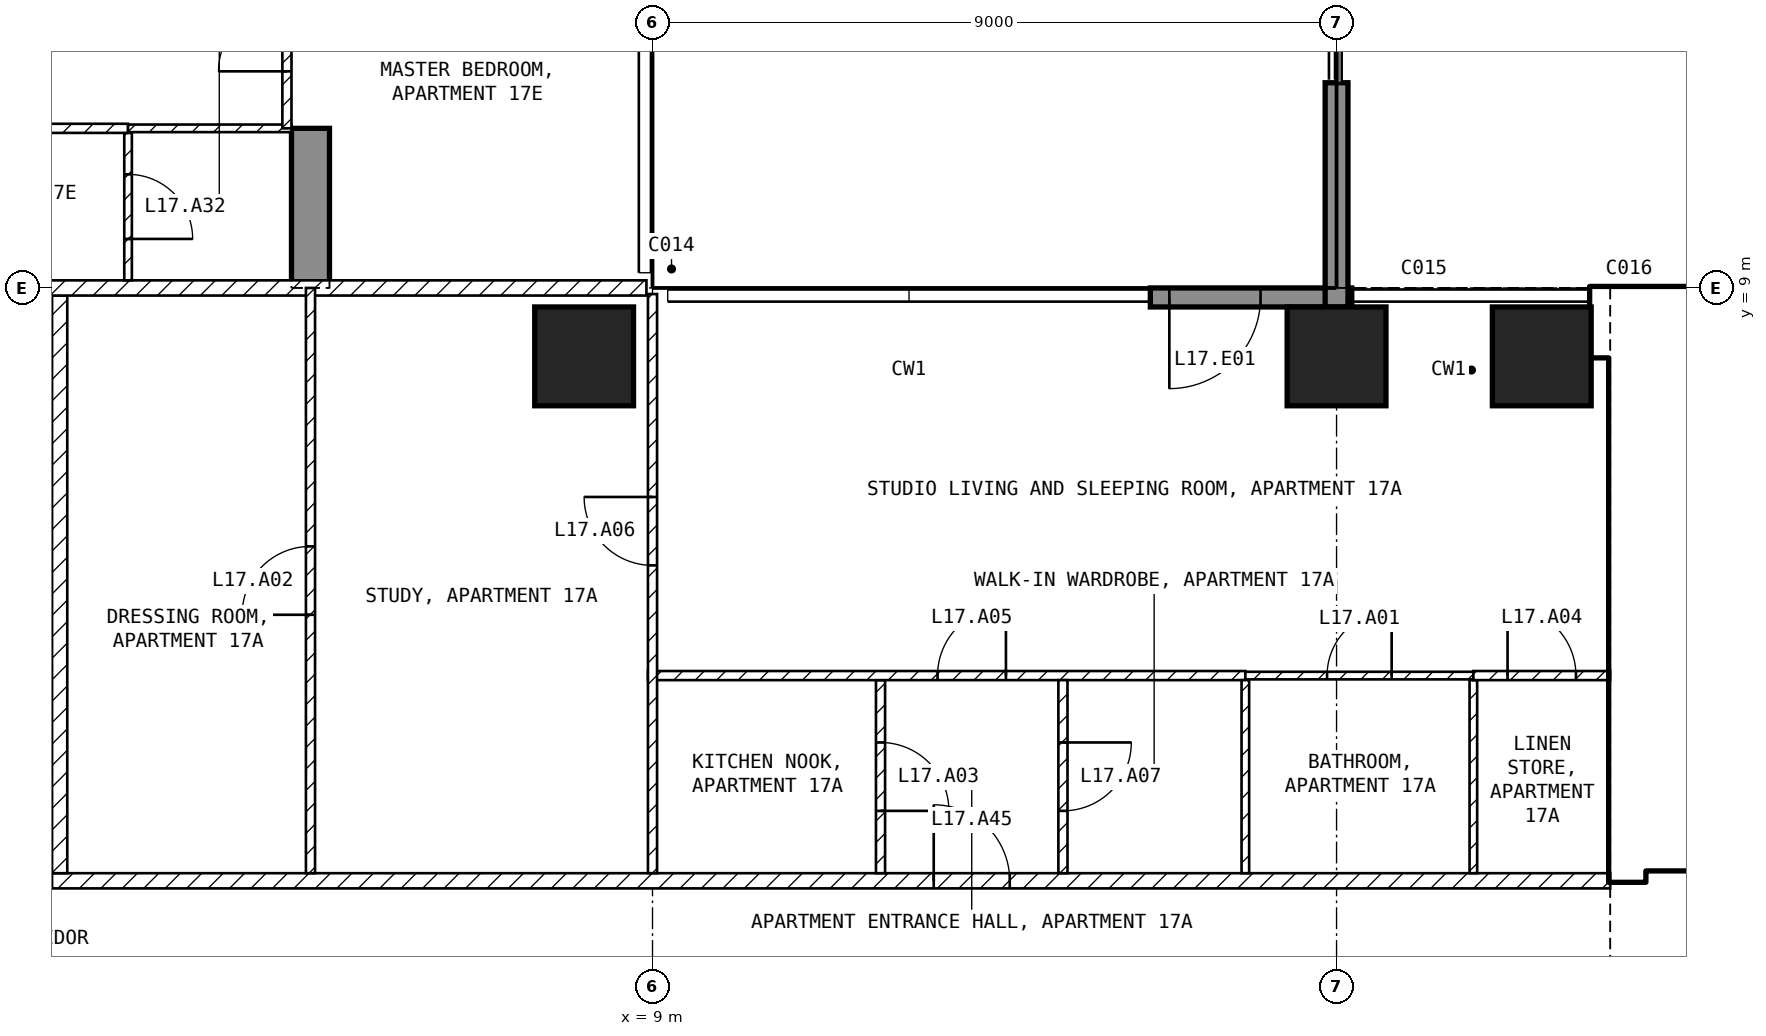
"""IFC4 building model, lengths in metres.
Left out: names, types, materials, properties, quantities, classifications, styles, units other than length and angle.
Written with IfcOpenShell. Run it as: python <this file> out.ifc"""

import sys

from ifc_helpers import new_model, si_unit, direction, frame, frame_2d, origin, origin_2d, place, context, subcontext, project, spatial, polyline, rectangle, outline, extrude, element, fill, save


model = new_model("IFC4")
c1 = context("Model", 3, precision=1e-05, world=origin(), true_north=direction((0.0, 1.0)))
c2 = subcontext(c1, "Body", "Model", "MODEL_VIEW")
j1 = project(units=[si_unit("LENGTHUNIT", "METRE"), si_unit("PLANEANGLEUNIT", "RADIAN")], contexts=[c1])
p1 = place(None, origin())
s1 = spatial("IfcSite", under=j1, at=p1, CompositionType="ELEMENT")
p2 = place(p1, origin())
s2 = spatial("IfcBuilding", under=s1, at=p2, CompositionType="ELEMENT")
p3 = place(p2, frame((0.0, 0.0, 78.5)))
s3 = spatial("IfcBuildingStorey", under=s2, at=p3, CompositionType="ELEMENT", Elevation=78.5)
for number, where, z_axis, x_axis in (
    (1, (8.1, 8.1, -0.25), (0.0, 0.0, 1.0), (1.0, 0.0, 0.0)),
    (2, (18.0, 8.1, -0.25), (0.0, 0.0, 1.0), (1.0, 0.0, 0.0)),
    (3, (20.7, 8.1, -0.25), (0.0, 0.0, 1.0), (1.0, 0.0, 0.0)),
):
    element("IfcColumn", number, at=place(p3, frame(where, z_axis=z_axis, x_axis=x_axis)), inside=s3, PredefinedType="COLUMN", context=c2, shape_type="SweptSolid", body=[
        extrude(rectangle(XDim=1.3, YDim=1.3, at=origin_2d()), origin(), (0.0, 0.0, 1.0), 3.5),
    ])
p4 = place(p3, frame((4.25, 9.0, -0.25), z_axis=(1.0, 0.0, 0.0), x_axis=(0.0, 1.0, 0.0)))
e4 = element("IfcWall", 4, at=p4, inside=s3, PredefinedType="SHEAR", context=c2, shape_type="SweptSolid", body=[
    extrude(outline(polyline([(0.0, 0.0), (2.1, 0.0), (2.1, 2.65), (4.5, 2.65), (4.5, 0.0), (9.9, 0.0), (9.9, 2.65), (12.3, 2.65), (12.3, 0.0), (16.45, 0.0), (16.45, 3.5), (0.0, 3.5), (0.0, 0.0)])), origin(), (0.0, 0.0, 1.0), 0.5),
])
p5 = place(p3, frame((18.2, 8.875, 0.0), z_axis=(0.0, 0.0, 1.0), x_axis=(-1.0, 0.0, 0.0)))
e5 = element("IfcWall", 5, at=p5, inside=s3, PredefinedType="SOLIDWALL", context=c2, shape_type="SweptSolid", body=[
    extrude(rectangle(XDim=2.65, YDim=0.25, at=frame_2d((1.325, 0.0))), origin(), (0.0, 0.0, 1.0), 3.25),
])
p6 = place(p5, frame((1.2, 0.0, 0.0)))
e6 = element("IfcOpeningElement", 6, at=p6, cuts=e5, PredefinedType="OPENING", context=c2, shape_type="SweptSolid", body=[
    extrude(rectangle(XDim=1.2, YDim=2.4, at=frame_2d((0.6, 1.2))), frame((0.0, 0.135, 0.0), z_axis=(0.0, -1.0, 0.0), x_axis=(1.0, 0.0, 0.0)), (0.0, 0.0, 1.0), 0.27),
])
p7 = place(p3, frame((18.0, 8.75, 0.0), z_axis=(0.0, 0.0, 1.0), x_axis=(0.0, 1.0, 0.0)))
e7 = element("IfcWall", 7, at=p7, inside=s3, PredefinedType="SOLIDWALL", context=c2, shape_type="SweptSolid", body=[
    extrude(rectangle(XDim=2.95, YDim=0.3, at=frame_2d((1.475, 0.0))), origin(), (0.0, 0.0, 1.0), 3.25),
])
p8 = place(p3, frame((21.35, 8.55, 0.0), z_axis=(0.0, 0.0, 1.0), x_axis=(1.0, 0.0, 0.0)))
e8 = element("IfcWall", 8, at=p8, inside=s3, PredefinedType="SHEAR", context=c2, shape_type="SweptSolid", body=[
    extrude(rectangle(XDim=10.15, YDim=0.9, at=frame_2d((5.075, 0.0))), origin(), (0.0, 0.0, 1.0), 3.25),
])
p9 = place(p3, frame((21.825, 1.2, 0.0), z_axis=(0.0, 0.0, 1.0), x_axis=(0.0, 1.0, 0.0)))
e9 = element("IfcWall", 9, at=p9, inside=s3, PredefinedType="SHEAR", context=c2, shape_type="SweptSolid", body=[
    extrude(rectangle(XDim=6.9, YDim=0.45, at=frame_2d((3.45, 0.0))), origin(), (0.0, 0.0, 1.0), 3.25),
])
p10 = place(p3, frame((22.05, 1.45, 0.0), z_axis=(0.0, 0.0, 1.0), x_axis=(1.0, 0.0, 0.0)))
e10 = element("IfcWall", 10, at=p10, inside=s3, PredefinedType="SOLIDWALL", context=c2, shape_type="SweptSolid", body=[
    extrude(rectangle(XDim=13.05, YDim=0.2, at=frame_2d((6.525, 0.0))), origin(), (0.0, 0.0, 1.0), 3.25),
])
p11 = place(p10, frame((0.75, 0.0, 0.0)))
e11 = element("IfcOpeningElement", 11, at=p11, cuts=e10, PredefinedType="OPENING", context=c2, shape_type="SweptSolid", body=[
    extrude(rectangle(XDim=1.0, YDim=2.1, at=frame_2d((0.5, 1.05))), frame((0.0, 0.11, 0.0), z_axis=(0.0, -1.0, 0.0), x_axis=(1.0, 0.0, 0.0)), (0.0, 0.0, 1.0), 0.22),
])
p12 = place(p10, frame((3.25, 0.0, 0.0)))
e12 = element("IfcOpeningElement", 12, at=p12, cuts=e10, PredefinedType="OPENING", context=c2, shape_type="SweptSolid", body=[
    extrude(rectangle(XDim=1.0, YDim=2.1, at=frame_2d((0.5, 1.05))), frame((0.0, 0.11, 0.0), z_axis=(0.0, -1.0, 0.0), x_axis=(1.0, 0.0, 0.0)), (0.0, 0.0, 1.0), 0.22),
])
p13 = place(p3, frame((22.05, 5.15, 0.0), z_axis=(0.0, 0.0, 1.0), x_axis=(1.0, 0.0, 0.0)))
e13 = element("IfcWall", 13, at=p13, inside=s3, PredefinedType="SOLIDWALL", context=c2, shape_type="SweptSolid", body=[
    extrude(rectangle(XDim=6.3, YDim=0.2, at=frame_2d((3.15, 0.0))), origin(), (0.0, 0.0, 1.0), 3.25),
])
p14 = place(p13, frame((0.2, 0.0, 0.0)))
e14 = element("IfcOpeningElement", 14, at=p14, cuts=e13, PredefinedType="OPENING", context=c2, shape_type="SweptSolid", body=[
    extrude(rectangle(XDim=1.0, YDim=2.1, at=frame_2d((0.5, 1.05))), frame((0.0, 0.11, 0.0), z_axis=(0.0, -1.0, 0.0), x_axis=(1.0, 0.0, 0.0)), (0.0, 0.0, 1.0), 0.22),
])
p15 = place(p3, frame((1.1, 1.2, 0.0), z_axis=(0.0, 0.0, 1.0), x_axis=(1.0, 0.0, 0.0)))
e15 = element("IfcWall", 15, at=p15, inside=s3, PredefinedType="PARTITIONING", context=c2, shape_type="SweptSolid", body=[
    extrude(rectangle(XDim=20.5, YDim=0.2, at=frame_2d((10.25, 0.0))), origin(), (0.0, 0.0, 1.0), 3.25),
])
p16 = place(p15, frame((11.6, 0.0, 0.0)))
e16 = element("IfcOpeningElement", 16, at=p16, cuts=e15, PredefinedType="OPENING", context=c2, shape_type="SweptSolid", body=[
    extrude(rectangle(XDim=1.0, YDim=2.1, at=frame_2d((0.5, 1.05))), frame((0.0, 0.11, 0.0), z_axis=(0.0, -1.0, 0.0), x_axis=(1.0, 0.0, 0.0)), (0.0, 0.0, 1.0), 0.22),
])
p17 = place(p3, frame((1.2, 8.9, 0.0), z_axis=(0.0, 0.0, 1.0), x_axis=(0.0, -1.0, 0.0)))
e17 = element("IfcWall", 17, at=p17, inside=s3, PredefinedType="PARTITIONING", context=c2, shape_type="SweptSolid", body=[
    extrude(rectangle(XDim=7.6, YDim=0.2, at=frame_2d((3.8, 0.0))), origin(), (0.0, 0.0, 1.0), 3.25),
])
p18 = place(p3, frame((-8.92, 9.0, 0.0), z_axis=(0.0, 0.0, 1.0), x_axis=(1.0, 0.0, 0.0)))
e18 = element("IfcWall", 18, at=p18, inside=s3, PredefinedType="PARTITIONING", context=c2, shape_type="SweptSolid", body=[
    extrude(rectangle(XDim=17.84, YDim=0.2, at=frame_2d((8.92, 0.0))), origin(), (0.0, 0.0, 1.0), 3.25),
])
p19 = place(p18, frame((8.42, 0.0, 0.0)))
e19 = element("IfcOpeningElement", 19, at=p19, cuts=e18, PredefinedType="OPENING", context=c2, shape_type="SweptSolid", body=[
    extrude(rectangle(XDim=1.0, YDim=2.1, at=frame_2d((0.5, 1.05))), frame((0.0, 0.11, 0.0), z_axis=(0.0, -1.0, 0.0), x_axis=(1.0, 0.0, 0.0)), (0.0, 0.0, 1.0), 0.22),
])
p20 = place(p3, frame((12.0, 3.84, 0.0), z_axis=(0.0, 0.0, 1.0), x_axis=(0.0, -1.0, 0.0)))
e20 = element("IfcWall", 20, at=p20, inside=s3, PredefinedType="PARTITIONING", context=c2, shape_type="SweptSolid", body=[
    extrude(rectangle(XDim=2.54, YDim=0.12, at=frame_2d((1.27, 0.0))), origin(), (0.0, 0.0, 1.0), 3.25),
])
p21 = place(p20, frame((0.82, 0.0, 0.0)))
e21 = element("IfcOpeningElement", 21, at=p21, cuts=e20, PredefinedType="OPENING", context=c2, shape_type="SweptSolid", body=[
    extrude(rectangle(XDim=0.9, YDim=2.1, at=frame_2d((0.45, 1.05))), frame((0.0, 0.07, 0.0), z_axis=(0.0, -1.0, 0.0), x_axis=(1.0, 0.0, 0.0)), (0.0, 0.0, 1.0), 0.14),
])
p22 = place(p3, frame((8.94, 3.9, 0.0), z_axis=(0.0, 0.0, 1.0), x_axis=(1.0, 0.0, 0.0)))
e22 = element("IfcWall", 22, at=p22, inside=s3, PredefinedType="PARTITIONING", context=c2, shape_type="SweptSolid", body=[
    extrude(rectangle(XDim=7.86, YDim=0.12, at=frame_2d((3.93, 0.0))), origin(), (0.0, 0.0, 1.0), 3.25),
])
p23 = place(p22, frame((3.81, 0.0, 0.0)))
e23 = element("IfcOpeningElement", 23, at=p23, cuts=e22, PredefinedType="OPENING", context=c2, shape_type="SweptSolid", body=[
    extrude(rectangle(XDim=0.9, YDim=2.1, at=frame_2d((0.45, 1.05))), frame((0.0, 0.07, 0.0), z_axis=(0.0, -1.0, 0.0), x_axis=(1.0, 0.0, 0.0)), (0.0, 0.0, 1.0), 0.14),
])
p24 = place(p3, frame((9.0, 1.3, 0.0), z_axis=(0.0, 0.0, 1.0), x_axis=(0.0, 1.0, 0.0)))
e24 = element("IfcWall", 24, at=p24, inside=s3, PredefinedType="PARTITIONING", context=c2, shape_type="SweptSolid", body=[
    extrude(rectangle(XDim=7.62, YDim=0.12, at=frame_2d((3.81, 0.0))), origin(), (0.0, 0.0, 1.0), 3.25),
])
p25 = place(p24, frame((4.05, 0.0, 0.0)))
e25 = element("IfcOpeningElement", 25, at=p25, cuts=e24, PredefinedType="OPENING", context=c2, shape_type="SweptSolid", body=[
    extrude(rectangle(XDim=0.9, YDim=2.1, at=frame_2d((0.45, 1.05))), frame((0.0, 0.07, 0.0), z_axis=(0.0, -1.0, 0.0), x_axis=(1.0, 0.0, 0.0)), (0.0, 0.0, 1.0), 0.14),
])
p26 = place(p3, frame((14.4, 3.84, 0.0), z_axis=(0.0, 0.0, 1.0), x_axis=(0.0, -1.0, 0.0)))
e26 = element("IfcWall", 26, at=p26, inside=s3, PredefinedType="PARTITIONING", context=c2, shape_type="SweptSolid", body=[
    extrude(rectangle(XDim=2.54, YDim=0.12, at=frame_2d((1.27, 0.0))), origin(), (0.0, 0.0, 1.0), 3.25),
])
p27 = place(p26, frame((0.82, 0.0, 0.0)))
e27 = element("IfcOpeningElement", 27, at=p27, cuts=e26, PredefinedType="OPENING", context=c2, shape_type="SweptSolid", body=[
    extrude(rectangle(XDim=0.9, YDim=2.1, at=frame_2d((0.45, 1.05))), frame((0.0, 0.07, 0.0), z_axis=(0.0, -1.0, 0.0), x_axis=(1.0, 0.0, 0.0)), (0.0, 0.0, 1.0), 0.14),
])
for number, where, z_axis, x_axis in (
    (28, (16.8, 3.84, 0.0), (0.0, 0.0, 1.0), (0.0, -1.0, 0.0)),
    (29, (19.8, 3.84, 0.0), (0.0, 0.0, 1.0), (0.0, -1.0, 0.0)),
):
    element("IfcWall", number, at=place(p3, frame(where, z_axis=z_axis, x_axis=x_axis)), inside=s3, PredefinedType="PARTITIONING", context=c2, shape_type="SweptSolid", body=[
        extrude(rectangle(XDim=2.54, YDim=0.1, at=frame_2d((1.27, 0.0))), origin(), (0.0, 0.0, 1.0), 3.25),
    ])
p28 = place(p3, frame((16.8, 3.9, 0.0), z_axis=(0.0, 0.0, 1.0), x_axis=(1.0, 0.0, 0.0)))
e30 = element("IfcWall", 30, at=p28, inside=s3, PredefinedType="PARTITIONING", context=c2, shape_type="SweptSolid", body=[
    extrude(rectangle(XDim=3.0, YDim=0.1, at=frame_2d((1.5, 0.0))), origin(), (0.0, 0.0, 1.0), 3.25),
])
p29 = place(p28, frame((1.075, 0.0, 0.0)))
e31 = element("IfcOpeningElement", 31, at=p29, cuts=e30, PredefinedType="OPENING", context=c2, shape_type="SweptSolid", body=[
    extrude(rectangle(XDim=0.85, YDim=2.1, at=frame_2d((0.425, 1.05))), frame((0.0, 0.06, 0.0), z_axis=(0.0, -1.0, 0.0), x_axis=(1.0, 0.0, 0.0)), (0.0, 0.0, 1.0), 0.12),
])
p30 = place(p3, frame((19.8, 3.9, 0.0), z_axis=(0.0, 0.0, 1.0), x_axis=(1.0, 0.0, 0.0)))
e32 = element("IfcWall", 32, at=p30, inside=s3, PredefinedType="PARTITIONING", context=c2, shape_type="SweptSolid", body=[
    extrude(rectangle(XDim=1.8, YDim=0.12, at=frame_2d((0.9, 0.0))), origin(), (0.0, 0.0, 1.0), 3.25),
])
p31 = place(p30, frame((0.45, 0.0, 0.0)))
e33 = element("IfcOpeningElement", 33, at=p31, cuts=e32, PredefinedType="OPENING", context=c2, shape_type="SweptSolid", body=[
    extrude(rectangle(XDim=0.9, YDim=2.1, at=frame_2d((0.45, 1.05))), frame((0.0, 0.07, 0.0), z_axis=(0.0, -1.0, 0.0), x_axis=(1.0, 0.0, 0.0)), (0.0, 0.0, 1.0), 0.14),
])
p32 = place(p3, frame((4.5, 1.3, 0.0), z_axis=(0.0, 0.0, 1.0), x_axis=(0.0, 1.0, 0.0)))
e34 = element("IfcWall", 34, at=p32, inside=s3, PredefinedType="PARTITIONING", context=c2, shape_type="SweptSolid", body=[
    extrude(rectangle(XDim=7.7, YDim=0.12, at=frame_2d((3.85, 0.0))), origin(), (0.0, 0.0, 1.0), 3.25),
])
p33 = place(p32, frame((3.4, 0.0, 0.0)))
e35 = element("IfcOpeningElement", 35, at=p33, cuts=e34, PredefinedType="OPENING", context=c2, shape_type="SweptSolid", body=[
    extrude(rectangle(XDim=0.9, YDim=2.1, at=frame_2d((0.45, 1.05))), frame((0.0, 0.07, 0.0), z_axis=(0.0, -1.0, 0.0), x_axis=(1.0, 0.0, 0.0)), (0.0, 0.0, 1.0), 0.14),
])
p34 = place(p3, frame((2.1, 11.04, 0.0), z_axis=(0.0, 0.0, 1.0), x_axis=(0.0, -1.0, 0.0)))
e36 = element("IfcWall", 36, at=p34, inside=s3, PredefinedType="PARTITIONING", context=c2, shape_type="SweptSolid", body=[
    extrude(rectangle(XDim=1.94, YDim=0.1, at=frame_2d((0.97, 0.0))), origin(), (0.0, 0.0, 1.0), 3.25),
])
p35 = place(p34, frame((0.545, 0.0, 0.0)))
e37 = element("IfcOpeningElement", 37, at=p35, cuts=e36, PredefinedType="OPENING", context=c2, shape_type="SweptSolid", body=[
    extrude(rectangle(XDim=0.85, YDim=2.1, at=frame_2d((0.425, 1.05))), frame((0.0, 0.06, 0.0), z_axis=(0.0, -1.0, 0.0), x_axis=(1.0, 0.0, 0.0)), (0.0, 0.0, 1.0), 0.12),
])
p36 = place(p3, frame((-4.25, 11.1, 0.0), z_axis=(0.0, 0.0, 1.0), x_axis=(1.0, 0.0, 0.0)))
e38 = element("IfcWall", 38, at=p36, inside=s3, PredefinedType="PARTITIONING", context=c2, shape_type="SweptSolid", body=[
    extrude(rectangle(XDim=6.35, YDim=0.12, at=frame_2d((3.175, 0.0))), origin(), (0.0, 0.0, 1.0), 3.25),
])
p37 = place(p36, frame((2.725, 0.0, 0.0)))
e39 = element("IfcOpeningElement", 39, at=p37, cuts=e38, PredefinedType="OPENING", context=c2, shape_type="SweptSolid", body=[
    extrude(rectangle(XDim=0.9, YDim=2.1, at=frame_2d((0.45, 1.05))), frame((0.0, 0.07, 0.0), z_axis=(0.0, -1.0, 0.0), x_axis=(1.0, 0.0, 0.0)), (0.0, 0.0, 1.0), 0.14),
])
p38 = place(p3, frame((2.1, 11.1, 0.0), z_axis=(0.0, 0.0, 1.0), x_axis=(1.0, 0.0, 0.0)))
e40 = element("IfcWall", 40, at=p38, inside=s3, PredefinedType="PARTITIONING", context=c2, shape_type="SweptSolid", body=[
    extrude(rectangle(XDim=2.15, YDim=0.1, at=frame_2d((1.075, 0.0))), origin(), (0.0, 0.0, 1.0), 3.25),
])
p39 = place(p3, frame((4.19, 11.1, 0.0), z_axis=(0.0, 0.0, 1.0), x_axis=(0.0, 1.0, 0.0)))
e41 = element("IfcWall", 41, at=p39, inside=s3, PredefinedType="PARTITIONING", context=c2, shape_type="SweptSolid", body=[
    extrude(rectangle(XDim=2.4, YDim=0.12, at=frame_2d((1.2, 0.0))), origin(), (0.0, 0.0, 1.0), 2.4),
])
p40 = place(p39, frame((0.75, 0.0, 0.0)))
e42 = element("IfcOpeningElement", 42, at=p40, cuts=e41, PredefinedType="OPENING", context=c2, shape_type="SweptSolid", body=[
    extrude(rectangle(XDim=0.9, YDim=2.1, at=frame_2d((0.45, 1.05))), frame((0.0, 0.07, 0.0), z_axis=(0.0, -1.0, 0.0), x_axis=(1.0, 0.0, 0.0)), (0.0, 0.0, 1.0), 0.14),
])
p41 = place(p6, origin())
e43 = element("IfcDoor", 43, at=p41, inside=s3, OperationType="SINGLE_SWING_RIGHT", PredefinedType="DOOR", context=c2, shape_type="SweptSolid", body=[
    extrude(rectangle(XDim=1.2, YDim=2.4, at=frame_2d((0.6, 1.2))), frame((0.0, 0.025, 0.0), z_axis=(0.0, -1.0, 0.0), x_axis=(1.0, 0.0, 0.0)), (0.0, 0.0, 1.0), 0.05),
])
fill(e6, e43)
p42 = place(p14, origin())
e44 = element("IfcDoor", 44, at=p42, inside=s3, OperationType="SINGLE_SWING_LEFT", PredefinedType="DOOR", context=c2, shape_type="SweptSolid", body=[
    extrude(rectangle(XDim=1.0, YDim=2.1, at=frame_2d((0.5, 1.05))), frame((0.0, 0.025, 0.0), z_axis=(0.0, -1.0, 0.0), x_axis=(1.0, 0.0, 0.0)), (0.0, 0.0, 1.0), 0.05),
])
fill(e14, e44)
p43 = place(p29, origin())
e45 = element("IfcDoor", 45, at=p43, inside=s3, OperationType="SINGLE_SWING_RIGHT", PredefinedType="DOOR", context=c2, shape_type="SweptSolid", body=[
    extrude(rectangle(XDim=0.85, YDim=2.1, at=frame_2d((0.425, 1.05))), frame((0.0, 0.025, 0.0), z_axis=(0.0, -1.0, 0.0), x_axis=(1.0, 0.0, 0.0)), (0.0, 0.0, 1.0), 0.05),
])
fill(e31, e45)
p44 = place(p33, origin())
e46 = element("IfcDoor", 46, at=p44, inside=s3, OperationType="SINGLE_SWING_LEFT", PredefinedType="DOOR", context=c2, shape_type="SweptSolid", body=[
    extrude(rectangle(XDim=0.9, YDim=2.1, at=frame_2d((0.45, 1.05))), frame((0.0, 0.025, 0.0), z_axis=(0.0, -1.0, 0.0), x_axis=(1.0, 0.0, 0.0)), (0.0, 0.0, 1.0), 0.05),
])
fill(e35, e46)
p45 = place(p21, origin())
e47 = element("IfcDoor", 47, at=p45, inside=s3, OperationType="SINGLE_SWING_RIGHT", PredefinedType="DOOR", context=c2, shape_type="SweptSolid", body=[
    extrude(rectangle(XDim=0.9, YDim=2.1, at=frame_2d((0.45, 1.05))), frame((0.0, 0.025, 0.0), z_axis=(0.0, -1.0, 0.0), x_axis=(1.0, 0.0, 0.0)), (0.0, 0.0, 1.0), 0.05),
])
fill(e21, e47)
p46 = place(p31, origin())
e48 = element("IfcDoor", 48, at=p46, inside=s3, OperationType="SINGLE_SWING_LEFT", PredefinedType="DOOR", context=c2, shape_type="SweptSolid", body=[
    extrude(rectangle(XDim=0.9, YDim=2.1, at=frame_2d((0.45, 1.05))), frame((0.0, 0.025, 0.0), z_axis=(0.0, -1.0, 0.0), x_axis=(1.0, 0.0, 0.0)), (0.0, 0.0, 1.0), 0.05),
])
fill(e33, e48)
p47 = place(p23, origin())
e49 = element("IfcDoor", 49, at=p47, inside=s3, OperationType="SINGLE_SWING_RIGHT", PredefinedType="DOOR", context=c2, shape_type="SweptSolid", body=[
    extrude(rectangle(XDim=0.9, YDim=2.1, at=frame_2d((0.45, 1.05))), frame((0.0, 0.025, 0.0), z_axis=(0.0, -1.0, 0.0), x_axis=(1.0, 0.0, 0.0)), (0.0, 0.0, 1.0), 0.05),
])
fill(e23, e49)
p48 = place(p25, origin())
e50 = element("IfcDoor", 50, at=p48, inside=s3, OperationType="SINGLE_SWING_RIGHT", PredefinedType="DOOR", context=c2, shape_type="SweptSolid", body=[
    extrude(rectangle(XDim=0.9, YDim=2.1, at=frame_2d((0.45, 1.05))), frame((0.0, 0.025, 0.0), z_axis=(0.0, -1.0, 0.0), x_axis=(1.0, 0.0, 0.0)), (0.0, 0.0, 1.0), 0.05),
])
fill(e25, e50)
p49 = place(p27, origin())
e51 = element("IfcDoor", 51, at=p49, inside=s3, OperationType="SINGLE_SWING_LEFT", PredefinedType="DOOR", context=c2, shape_type="SweptSolid", body=[
    extrude(rectangle(XDim=0.9, YDim=2.1, at=frame_2d((0.45, 1.05))), frame((0.0, 0.025, 0.0), z_axis=(0.0, -1.0, 0.0), x_axis=(1.0, 0.0, 0.0)), (0.0, 0.0, 1.0), 0.05),
])
fill(e27, e51)
p50 = place(p35, origin())
e52 = element("IfcDoor", 52, at=p50, inside=s3, OperationType="SINGLE_SWING_RIGHT", PredefinedType="DOOR", context=c2, shape_type="SweptSolid", body=[
    extrude(rectangle(XDim=0.85, YDim=2.1, at=frame_2d((0.425, 1.05))), frame((0.0, 0.025, 0.0), z_axis=(0.0, -1.0, 0.0), x_axis=(1.0, 0.0, 0.0)), (0.0, 0.0, 1.0), 0.05),
])
fill(e37, e52)
p51 = place(p16, origin())
e53 = element("IfcDoor", 53, at=p51, inside=s3, OperationType="SINGLE_SWING_LEFT", PredefinedType="DOOR", context=c2, shape_type="SweptSolid", body=[
    extrude(rectangle(XDim=1.0, YDim=2.1, at=frame_2d((0.5, 1.05))), frame((0.0, 0.025, 0.0), z_axis=(0.0, -1.0, 0.0), x_axis=(1.0, 0.0, 0.0)), (0.0, 0.0, 1.0), 0.05),
])
fill(e16, e53)
p52 = place(p40, origin())
e54 = element("IfcDoor", 54, at=p52, inside=s3, OperationType="SINGLE_SWING_LEFT", PredefinedType="DOOR", context=c2, shape_type="SweptSolid", body=[
    extrude(rectangle(XDim=0.9, YDim=2.1, at=frame_2d((0.45, 1.05))), frame((0.0, 0.025, 0.0), z_axis=(0.0, -1.0, 0.0), x_axis=(1.0, 0.0, 0.0)), (0.0, 0.0, 1.0), 0.05),
])
fill(e42, e54)
save(model, sys.argv[1])
